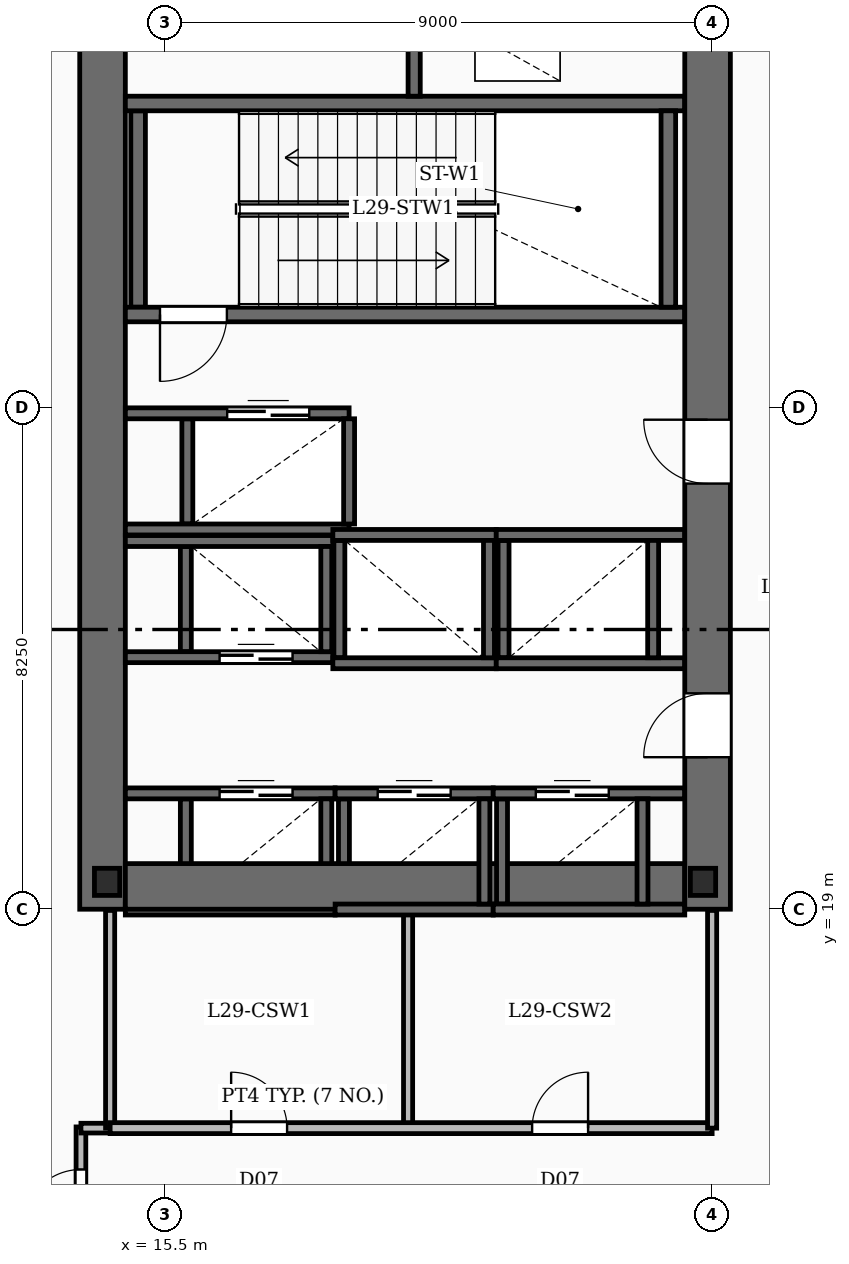
"""IFC4 building model, lengths in metres.
Left out: names, types, materials, properties, quantities, classifications, styles, units other than length and angle.
Written with IfcOpenShell. Run it as: python <this file> out.ifc"""

import sys

from ifc_helpers import new_model, si_unit, direction, frame, frame_2d, origin, origin_2d, place, context, subcontext, project, spatial, rectangle, i_section, extrude, element, fill, save


model = new_model("IFC4")
c1 = context("Model", 3, precision=1e-05, world=origin(), true_north=direction((0.0, 1.0)))
c2 = subcontext(c1, "Body", "Model", "MODEL_VIEW")
j1 = project(units=[si_unit("LENGTHUNIT", "METRE"), si_unit("PLANEANGLEUNIT", "RADIAN")], contexts=[c1])
p1 = place(None, origin())
s1 = spatial("IfcSite", under=j1, at=p1, CompositionType="ELEMENT")
p2 = place(p1, origin())
s2 = spatial("IfcBuilding", under=s1, at=p2, CompositionType="ELEMENT")
p3 = place(p2, frame((0.0, 0.0, 125.95)))
s3 = spatial("IfcBuildingStorey", under=s2, at=p3, CompositionType="ELEMENT", Elevation=125.95)
p4 = place(p3, frame((14.475, 19.0, -0.31), z_axis=(0.0, 0.0, 1.0), x_axis=(0.0, 1.0, 0.0)))
e1 = element("IfcWall", 1, at=p4, inside=s3, PredefinedType="SHEAR", context=c2, shape_type="SweptSolid", body=[
    extrude(rectangle(XDim=15.3, YDim=0.75, at=frame_2d((7.65, 0.0))), origin(), (0.0, 0.0, 1.0), 4.84),
])
p5 = place(p3, frame((24.425, 19.0, -0.31), z_axis=(0.0, 0.0, 1.0), x_axis=(0.0, 1.0, 0.0)))
e2 = element("IfcWall", 2, at=p5, inside=s3, PredefinedType="SHEAR", context=c2, shape_type="SweptSolid", body=[
    extrude(rectangle(XDim=15.3, YDim=0.75, at=frame_2d((7.65, 0.0))), origin(), (0.0, 0.0, 1.0), 4.84),
])
p6 = place(p5, frame((2.5, 0.0, 0.31)))
e3 = element("IfcOpeningElement", 3, at=p6, cuts=e2, PredefinedType="OPENING", context=c2, shape_type="SweptSolid", body=[
    extrude(rectangle(XDim=1.05, YDim=2.15, at=frame_2d((0.525, 1.075))), frame((0.0, 0.385, 0.0), z_axis=(0.0, -1.0, 0.0), x_axis=(1.0, 0.0, 0.0)), (0.0, 0.0, 1.0), 0.77),
])
p7 = place(p5, frame((7.0, 0.0, 0.31)))
e4 = element("IfcOpeningElement", 4, at=p7, cuts=e2, PredefinedType="OPENING", context=c2, shape_type="SweptSolid", body=[
    extrude(rectangle(XDim=1.05, YDim=2.15, at=frame_2d((0.525, 1.075))), frame((0.0, 0.385, 0.0), z_axis=(0.0, -1.0, 0.0), x_axis=(1.0, 0.0, 0.0)), (0.0, 0.0, 1.0), 0.77),
])
p8 = place(p3, frame((14.85, 19.375, -0.31), z_axis=(0.0, 0.0, 1.0), x_axis=(1.0, 0.0, 0.0)))
e5 = element("IfcWall", 5, at=p8, inside=s3, PredefinedType="SHEAR", context=c2, shape_type="SweptSolid", body=[
    extrude(rectangle(XDim=9.2, YDim=0.75, at=frame_2d((4.6, 0.0))), origin(), (0.0, 0.0, 1.0), 4.84),
])
for number, where, z_axis, x_axis in (
    (6, (14.55, 19.45, -0.31), (0.0, 0.0, 1.0), (1.0, 0.0, 0.0)),
    (7, (24.35, 19.45, -0.31), (0.0, 0.0, 1.0), (1.0, 0.0, 0.0)),
):
    element("IfcColumn", number, at=place(p3, frame(where, z_axis=z_axis, x_axis=x_axis)), inside=s3, PredefinedType="COLUMN", context=c2, shape_type="SweptSolid", body=[
        extrude(i_section(OverallWidth=0.416, OverallDepth=0.446, WebThickness=0.039, FlangeThickness=0.063, FilletRadius=0.02, at=origin_2d()), origin(), (0.0, 0.0, 1.0), 4.84),
    ])
p9 = place(p3, frame((24.05, 28.78, 0.0), z_axis=(0.0, 0.0, 1.0), x_axis=(-1.0, 0.0, 0.0)))
e8 = element("IfcWall", 8, at=p9, inside=s3, PredefinedType="SOLIDWALL", context=c2, shape_type="SweptSolid", body=[
    extrude(rectangle(XDim=9.2, YDim=0.24, at=frame_2d((4.6, 0.0))), origin(), (0.0, 0.0, 1.0), 4.53),
])
p10 = place(p9, frame((7.53, 0.0, 0.0)))
e9 = element("IfcOpeningElement", 9, at=p10, cuts=e8, PredefinedType="OPENING", context=c2, shape_type="SweptSolid", body=[
    extrude(rectangle(XDim=1.1, YDim=2.15, at=frame_2d((0.55, 1.075))), frame((0.0, 0.13, 0.0), z_axis=(0.0, -1.0, 0.0), x_axis=(1.0, 0.0, 0.0)), (0.0, 0.0, 1.0), 0.26),
])
p11 = place(p3, frame((14.85, 32.25, 0.0), z_axis=(0.0, 0.0, 1.0), x_axis=(1.0, 0.0, 0.0)))
e10 = element("IfcWall", 10, at=p11, inside=s3, PredefinedType="SOLIDWALL", context=c2, shape_type="SweptSolid", body=[
    extrude(rectangle(XDim=9.2, YDim=0.24, at=frame_2d((4.6, 0.0))), origin(), (0.0, 0.0, 1.0), 4.53),
])
for number, where, z_axis, x_axis in (
    (11, (15.06, 28.9, 0.0), (0.0, 0.0, 1.0), (0.0, 1.0, 0.0)),
    (12, (23.78, 28.9, 0.0), (0.0, 0.0, 1.0), (0.0, 1.0, 0.0)),
):
    element("IfcWall", number, at=place(p3, frame(where, z_axis=z_axis, x_axis=x_axis)), inside=s3, PredefinedType="SOLIDWALL", context=c2, shape_type="SweptSolid", body=[
        extrude(rectangle(XDim=3.23, YDim=0.24, at=frame_2d((1.615, 0.0))), origin(), (0.0, 0.0, 1.0), 4.53),
    ])
p12 = place(p3, frame((19.6, 32.37, 0.0), z_axis=(0.0, 0.0, 1.0), x_axis=(0.0, 1.0, 0.0)))
e13 = element("IfcWall", 13, at=p12, inside=s3, PredefinedType="SOLIDWALL", context=c2, shape_type="SweptSolid", body=[
    extrude(rectangle(XDim=1.13, YDim=0.2, at=frame_2d((0.565, 0.0))), origin(), (0.0, 0.0, 1.0), 4.53),
])
p13 = place(p3, frame((14.85, 20.905, 0.0), z_axis=(0.0, 0.0, 1.0), x_axis=(1.0, 0.0, 0.0)))
e14 = element("IfcWall", 14, at=p13, inside=s3, PredefinedType="SOLIDWALL", context=c2, shape_type="SweptSolid", body=[
    extrude(rectangle(XDim=3.45, YDim=0.18, at=frame_2d((1.725, 0.0))), origin(), (0.0, 0.0, 1.0), 4.53),
])
p14 = place(p13, frame((1.55, 0.0, 0.0)))
e15 = element("IfcOpeningElement", 15, at=p14, cuts=e14, PredefinedType="OPENING", context=c2, shape_type="SweptSolid", body=[
    extrude(rectangle(XDim=1.2, YDim=2.2, at=frame_2d((0.6, 1.1))), frame((0.0, 0.1, 0.0), z_axis=(0.0, -1.0, 0.0), x_axis=(1.0, 0.0, 0.0)), (0.0, 0.0, 1.0), 0.2),
])
p15 = place(p3, frame((14.85, 18.995, 0.0), z_axis=(0.0, 0.0, 1.0), x_axis=(1.0, 0.0, 0.0)))
e16 = element("IfcWall", 16, at=p15, inside=s3, PredefinedType="SOLIDWALL", context=c2, shape_type="SweptSolid", body=[
    extrude(rectangle(XDim=3.45, YDim=0.18, at=frame_2d((1.725, 0.0))), origin(), (0.0, 0.0, 1.0), 4.53),
])
for number, where, z_axis, x_axis in (
    (17, (15.845, 19.085, 0.0), (0.0, 0.0, 1.0), (0.0, 1.0, 0.0)),
    (18, (18.155, 19.085, 0.0), (0.0, 0.0, 1.0), (0.0, 1.0, 0.0)),
):
    element("IfcWall", number, at=place(p3, frame(where, z_axis=z_axis, x_axis=x_axis)), inside=s3, PredefinedType="SOLIDWALL", context=c2, shape_type="SweptSolid", body=[
        extrude(rectangle(XDim=1.73, YDim=0.18, at=frame_2d((0.865, 0.0))), origin(), (0.0, 0.0, 1.0), 4.53),
    ])
p16 = place(p3, frame((18.3, 20.905, 0.0), z_axis=(0.0, 0.0, 1.0), x_axis=(1.0, 0.0, 0.0)))
e19 = element("IfcWall", 19, at=p16, inside=s3, PredefinedType="SOLIDWALL", context=c2, shape_type="SweptSolid", body=[
    extrude(rectangle(XDim=2.6, YDim=0.18, at=frame_2d((1.3, 0.0))), origin(), (0.0, 0.0, 1.0), 4.53),
])
p17 = place(p16, frame((0.7, 0.0, 0.0)))
e20 = element("IfcOpeningElement", 20, at=p17, cuts=e19, PredefinedType="OPENING", context=c2, shape_type="SweptSolid", body=[
    extrude(rectangle(XDim=1.2, YDim=2.2, at=frame_2d((0.6, 1.1))), frame((0.0, 0.1, 0.0), z_axis=(0.0, -1.0, 0.0), x_axis=(1.0, 0.0, 0.0)), (0.0, 0.0, 1.0), 0.2),
])
p18 = place(p3, frame((18.3, 18.995, 0.0), z_axis=(0.0, 0.0, 1.0), x_axis=(1.0, 0.0, 0.0)))
e21 = element("IfcWall", 21, at=p18, inside=s3, PredefinedType="SOLIDWALL", context=c2, shape_type="SweptSolid", body=[
    extrude(rectangle(XDim=2.6, YDim=0.18, at=frame_2d((1.3, 0.0))), origin(), (0.0, 0.0, 1.0), 4.53),
])
for number, where, z_axis, x_axis in (
    (22, (18.445, 19.085, 0.0), (0.0, 0.0, 1.0), (0.0, 1.0, 0.0)),
    (23, (20.755, 19.085, 0.0), (0.0, 0.0, 1.0), (0.0, 1.0, 0.0)),
):
    element("IfcWall", number, at=place(p3, frame(where, z_axis=z_axis, x_axis=x_axis)), inside=s3, PredefinedType="SOLIDWALL", context=c2, shape_type="SweptSolid", body=[
        extrude(rectangle(XDim=1.73, YDim=0.18, at=frame_2d((0.865, 0.0))), origin(), (0.0, 0.0, 1.0), 4.53),
    ])
p19 = place(p3, frame((20.9, 20.905, 0.0), z_axis=(0.0, 0.0, 1.0), x_axis=(1.0, 0.0, 0.0)))
e24 = element("IfcWall", 24, at=p19, inside=s3, PredefinedType="SOLIDWALL", context=c2, shape_type="SweptSolid", body=[
    extrude(rectangle(XDim=3.15, YDim=0.18, at=frame_2d((1.575, 0.0))), origin(), (0.0, 0.0, 1.0), 4.53),
])
p20 = place(p19, frame((0.7, 0.0, 0.0)))
e25 = element("IfcOpeningElement", 25, at=p20, cuts=e24, PredefinedType="OPENING", context=c2, shape_type="SweptSolid", body=[
    extrude(rectangle(XDim=1.2, YDim=2.2, at=frame_2d((0.6, 1.1))), frame((0.0, 0.1, 0.0), z_axis=(0.0, -1.0, 0.0), x_axis=(1.0, 0.0, 0.0)), (0.0, 0.0, 1.0), 0.2),
])
p21 = place(p3, frame((20.9, 18.995, 0.0), z_axis=(0.0, 0.0, 1.0), x_axis=(1.0, 0.0, 0.0)))
e26 = element("IfcWall", 26, at=p21, inside=s3, PredefinedType="SOLIDWALL", context=c2, shape_type="SweptSolid", body=[
    extrude(rectangle(XDim=3.15, YDim=0.18, at=frame_2d((1.575, 0.0))), origin(), (0.0, 0.0, 1.0), 4.53),
])
for number, where, z_axis, x_axis in (
    (27, (21.045, 19.085, 0.0), (0.0, 0.0, 1.0), (0.0, 1.0, 0.0)),
    (28, (23.355, 19.085, 0.0), (0.0, 0.0, 1.0), (0.0, 1.0, 0.0)),
):
    element("IfcWall", number, at=place(p3, frame(where, z_axis=z_axis, x_axis=x_axis)), inside=s3, PredefinedType="SOLIDWALL", context=c2, shape_type="SweptSolid", body=[
        extrude(rectangle(XDim=1.73, YDim=0.18, at=frame_2d((0.865, 0.0))), origin(), (0.0, 0.0, 1.0), 4.53),
    ])
p22 = place(p3, frame((14.85, 25.055, 0.0), z_axis=(0.0, 0.0, 1.0), x_axis=(1.0, 0.0, 0.0)))
e29 = element("IfcWall", 29, at=p22, inside=s3, PredefinedType="SOLIDWALL", context=c2, shape_type="SweptSolid", body=[
    extrude(rectangle(XDim=3.412, YDim=0.18, at=frame_2d((1.706, 0.0))), origin(), (0.0, 0.0, 1.0), 4.53),
])
p23 = place(p3, frame((14.85, 23.145, 0.0), z_axis=(0.0, 0.0, 1.0), x_axis=(1.0, 0.0, 0.0)))
e30 = element("IfcWall", 30, at=p23, inside=s3, PredefinedType="SOLIDWALL", context=c2, shape_type="SweptSolid", body=[
    extrude(rectangle(XDim=3.412, YDim=0.18, at=frame_2d((1.706, 0.0))), origin(), (0.0, 0.0, 1.0), 4.53),
])
p24 = place(p23, frame((1.55, 0.0, 0.0)))
e31 = element("IfcOpeningElement", 31, at=p24, cuts=e30, PredefinedType="OPENING", context=c2, shape_type="SweptSolid", body=[
    extrude(rectangle(XDim=1.2, YDim=2.2, at=frame_2d((0.6, 1.1))), frame((0.0, 0.1, 0.0), z_axis=(0.0, -1.0, 0.0), x_axis=(1.0, 0.0, 0.0)), (0.0, 0.0, 1.0), 0.2),
])
for number, where, z_axis, x_axis in (
    (32, (15.845, 23.235, 0.0), (0.0, 0.0, 1.0), (0.0, 1.0, 0.0)),
    (33, (18.155, 23.235, 0.0), (0.0, 0.0, 1.0), (0.0, 1.0, 0.0)),
):
    element("IfcWall", number, at=place(p3, frame(where, z_axis=z_axis, x_axis=x_axis)), inside=s3, PredefinedType="SOLIDWALL", context=c2, shape_type="SweptSolid", body=[
        extrude(rectangle(XDim=1.73, YDim=0.18, at=frame_2d((0.865, 0.0))), origin(), (0.0, 0.0, 1.0), 4.53),
    ])
for number, where, z_axis, x_axis in (
    (34, (18.262, 25.155, 0.0), (0.0, 0.0, 1.0), (1.0, 0.0, 0.0)),
    (35, (18.262, 23.045, 0.0), (0.0, 0.0, 1.0), (1.0, 0.0, 0.0)),
):
    element("IfcWall", number, at=place(p3, frame(where, z_axis=z_axis, x_axis=x_axis)), inside=s3, PredefinedType="SOLIDWALL", context=c2, shape_type="SweptSolid", body=[
        extrude(rectangle(XDim=2.688, YDim=0.18, at=frame_2d((1.344, 0.0))), origin(), (0.0, 0.0, 1.0), 4.53),
    ])
for number, where, z_axis, x_axis in (
    (36, (18.37, 23.135, 0.0), (0.0, 0.0, 1.0), (0.0, 1.0, 0.0)),
    (37, (20.83, 23.135, 0.0), (0.0, 0.0, 1.0), (0.0, 1.0, 0.0)),
):
    element("IfcWall", number, at=place(p3, frame(where, z_axis=z_axis, x_axis=x_axis)), inside=s3, PredefinedType="SOLIDWALL", context=c2, shape_type="SweptSolid", body=[
        extrude(rectangle(XDim=1.93, YDim=0.18, at=frame_2d((0.965, 0.0))), origin(), (0.0, 0.0, 1.0), 4.53),
    ])
for number, where, z_axis, x_axis in (
    (38, (20.95, 25.155, 0.0), (0.0, 0.0, 1.0), (1.0, 0.0, 0.0)),
    (39, (20.95, 23.045, 0.0), (0.0, 0.0, 1.0), (1.0, 0.0, 0.0)),
):
    element("IfcWall", number, at=place(p3, frame(where, z_axis=z_axis, x_axis=x_axis)), inside=s3, PredefinedType="SOLIDWALL", context=c2, shape_type="SweptSolid", body=[
        extrude(rectangle(XDim=3.1, YDim=0.18, at=frame_2d((1.55, 0.0))), origin(), (0.0, 0.0, 1.0), 4.53),
    ])
for number, where, z_axis, x_axis in (
    (40, (21.07, 23.135, 0.0), (0.0, 0.0, 1.0), (0.0, 1.0, 0.0)),
    (41, (23.53, 23.135, 0.0), (0.0, 0.0, 1.0), (0.0, 1.0, 0.0)),
):
    element("IfcWall", number, at=place(p3, frame(where, z_axis=z_axis, x_axis=x_axis)), inside=s3, PredefinedType="SOLIDWALL", context=c2, shape_type="SweptSolid", body=[
        extrude(rectangle(XDim=1.93, YDim=0.18, at=frame_2d((0.965, 0.0))), origin(), (0.0, 0.0, 1.0), 4.53),
    ])
p25 = place(p3, frame((14.85, 27.155, 0.0), z_axis=(0.0, 0.0, 1.0), x_axis=(1.0, 0.0, 0.0)))
e42 = element("IfcWall", 42, at=p25, inside=s3, PredefinedType="SOLIDWALL", context=c2, shape_type="SweptSolid", body=[
    extrude(rectangle(XDim=3.68, YDim=0.18, at=frame_2d((1.84, 0.0))), origin(), (0.0, 0.0, 1.0), 4.53),
])
p26 = place(p25, frame((1.675, 0.0, 0.0)))
e43 = element("IfcOpeningElement", 43, at=p26, cuts=e42, PredefinedType="OPENING", context=c2, shape_type="SweptSolid", body=[
    extrude(rectangle(XDim=1.35, YDim=2.3, at=frame_2d((0.675, 1.15))), frame((0.0, 0.1, 0.0), z_axis=(0.0, -1.0, 0.0), x_axis=(1.0, 0.0, 0.0)), (0.0, 0.0, 1.0), 0.2),
])
p27 = place(p3, frame((14.85, 25.245, 0.0), z_axis=(0.0, 0.0, 1.0), x_axis=(1.0, 0.0, 0.0)))
e44 = element("IfcWall", 44, at=p27, inside=s3, PredefinedType="SOLIDWALL", context=c2, shape_type="SweptSolid", body=[
    extrude(rectangle(XDim=3.68, YDim=0.18, at=frame_2d((1.84, 0.0))), origin(), (0.0, 0.0, 1.0), 4.53),
])
for number, where, z_axis, x_axis in (
    (45, (15.87, 25.335, 0.0), (0.0, 0.0, 1.0), (0.0, 1.0, 0.0)),
    (46, (18.53, 25.335, 0.0), (0.0, 0.0, 1.0), (0.0, 1.0, 0.0)),
):
    element("IfcWall", number, at=place(p3, frame(where, z_axis=z_axis, x_axis=x_axis)), inside=s3, PredefinedType="SOLIDWALL", context=c2, shape_type="SweptSolid", body=[
        extrude(rectangle(XDim=1.73, YDim=0.18, at=frame_2d((0.865, 0.0))), origin(), (0.0, 0.0, 1.0), 4.53),
    ])
p28 = place(p3, frame((19.5, 15.4, 0.0), z_axis=(0.0, 0.0, 1.0), x_axis=(0.0, 1.0, 0.0)))
e47 = element("IfcWall", 47, at=p28, inside=s3, PredefinedType="PARTITIONING", context=c2, shape_type="SweptSolid", body=[
    extrude(rectangle(XDim=3.58, YDim=0.15, at=frame_2d((1.79, 0.0))), origin(), (0.0, 0.0, 1.0), 3.59),
])
p29 = place(p3, frame((14.6, 15.4, 0.0), z_axis=(0.0, 0.0, 1.0), x_axis=(1.0, 0.0, 0.0)))
e48 = element("IfcWall", 48, at=p29, inside=s3, PredefinedType="PARTITIONING", context=c2, shape_type="SweptSolid", body=[
    extrude(rectangle(XDim=9.9, YDim=0.18, at=frame_2d((4.95, 0.0))), origin(), (0.0, 0.0, 1.0), 3.59),
])
p30 = place(p29, frame((1.99, 0.0, 0.0)))
e49 = element("IfcOpeningElement", 49, at=p30, cuts=e48, PredefinedType="OPENING", context=c2, shape_type="SweptSolid", body=[
    extrude(rectangle(XDim=0.92, YDim=2.1, at=frame_2d((0.46, 1.05))), frame((0.0, 0.1, 0.0), z_axis=(0.0, -1.0, 0.0), x_axis=(1.0, 0.0, 0.0)), (0.0, 0.0, 1.0), 0.2),
])
p31 = place(p29, frame((6.94, 0.0, 0.0)))
e50 = element("IfcOpeningElement", 50, at=p31, cuts=e48, PredefinedType="OPENING", context=c2, shape_type="SweptSolid", body=[
    extrude(rectangle(XDim=0.92, YDim=2.1, at=frame_2d((0.46, 1.05))), frame((0.0, 0.1, 0.0), z_axis=(0.0, -1.0, 0.0), x_axis=(1.0, 0.0, 0.0)), (0.0, 0.0, 1.0), 0.2),
])
for number, where, z_axis, x_axis in (
    (51, (14.6, 15.4, 0.0), (0.0, 0.0, 1.0), (0.0, 1.0, 0.0)),
    (52, (24.5, 15.4, 0.0), (0.0, 0.0, 1.0), (0.0, 1.0, 0.0)),
):
    element("IfcWall", number, at=place(p3, frame(where, z_axis=z_axis, x_axis=x_axis)), inside=s3, PredefinedType="PARTITIONING", context=c2, shape_type="SweptSolid", body=[
        extrude(rectangle(XDim=3.58, YDim=0.15, at=frame_2d((1.79, 0.0))), origin(), (0.0, 0.0, 1.0), 3.59),
    ])
p32 = place(p3, frame((14.12, 15.4, 0.0), z_axis=(0.0, 0.0, 1.0), x_axis=(1.0, 0.0, 0.0)))
e53 = element("IfcWall", 53, at=p32, inside=s3, PredefinedType="PARTITIONING", context=c2, shape_type="SweptSolid", body=[
    extrude(rectangle(XDim=0.5, YDim=0.16, at=frame_2d((0.25, 0.0))), origin(), (0.0, 0.0, 1.0), 3.59),
])
p33 = place(p3, frame((14.12, 13.12, 0.0), z_axis=(0.0, 0.0, 1.0), x_axis=(0.0, 1.0, 0.0)))
e54 = element("IfcWall", 54, at=p33, inside=s3, PredefinedType="PARTITIONING", context=c2, shape_type="SweptSolid", body=[
    extrude(rectangle(XDim=2.3, YDim=0.16, at=frame_2d((1.15, 0.0))), origin(), (0.0, 0.0, 1.0), 3.59),
])
p34 = place(p33, frame((0.65, 0.0, 0.0)))
e55 = element("IfcOpeningElement", 55, at=p34, cuts=e54, PredefinedType="OPENING", context=c2, shape_type="SweptSolid", body=[
    extrude(rectangle(XDim=0.95, YDim=2.15, at=frame_2d((0.475, 1.075))), frame((0.0, 0.09, 0.0), z_axis=(0.0, -1.0, 0.0), x_axis=(1.0, 0.0, 0.0)), (0.0, 0.0, 1.0), 0.18),
])
p35 = place(p6, origin())
e56 = element("IfcDoor", 56, at=p35, inside=s3, OperationType="SINGLE_SWING_LEFT", PredefinedType="DOOR", context=c2, shape_type="SweptSolid", body=[
    extrude(rectangle(XDim=1.05, YDim=2.15, at=frame_2d((0.525, 1.075))), frame((0.0, 0.025, 0.0), z_axis=(0.0, -1.0, 0.0), x_axis=(1.0, 0.0, 0.0)), (0.0, 0.0, 1.0), 0.05),
])
fill(e3, e56)
p36 = place(p7, origin())
e57 = element("IfcDoor", 57, at=p36, inside=s3, OperationType="SINGLE_SWING_RIGHT", PredefinedType="DOOR", context=c2, shape_type="SweptSolid", body=[
    extrude(rectangle(XDim=1.05, YDim=2.15, at=frame_2d((0.525, 1.075))), frame((0.0, 0.025, 0.0), z_axis=(0.0, -1.0, 0.0), x_axis=(1.0, 0.0, 0.0)), (0.0, 0.0, 1.0), 0.05),
])
fill(e4, e57)
p37 = place(p10, origin())
e58 = element("IfcDoor", 58, at=p37, inside=s3, OperationType="SINGLE_SWING_RIGHT", PredefinedType="DOOR", context=c2, shape_type="SweptSolid", body=[
    extrude(rectangle(XDim=1.1, YDim=2.15, at=frame_2d((0.55, 1.075))), frame((0.0, 0.025, 0.0), z_axis=(0.0, -1.0, 0.0), x_axis=(1.0, 0.0, 0.0)), (0.0, 0.0, 1.0), 0.05),
])
fill(e9, e58)
p38 = place(p14, origin())
e59 = element("IfcDoor", 59, at=p38, inside=s3, OperationType="DOUBLE_DOOR_SLIDING", PredefinedType="DOOR", context=c2, shape_type="SweptSolid", body=[
    extrude(rectangle(XDim=1.2, YDim=2.2, at=frame_2d((0.6, 1.1))), frame((0.0, 0.025, 0.0), z_axis=(0.0, -1.0, 0.0), x_axis=(1.0, 0.0, 0.0)), (0.0, 0.0, 1.0), 0.05),
])
fill(e15, e59)
p39 = place(p17, origin())
e60 = element("IfcDoor", 60, at=p39, inside=s3, OperationType="DOUBLE_DOOR_SLIDING", PredefinedType="DOOR", context=c2, shape_type="SweptSolid", body=[
    extrude(rectangle(XDim=1.2, YDim=2.2, at=frame_2d((0.6, 1.1))), frame((0.0, 0.025, 0.0), z_axis=(0.0, -1.0, 0.0), x_axis=(1.0, 0.0, 0.0)), (0.0, 0.0, 1.0), 0.05),
])
fill(e20, e60)
p40 = place(p20, origin())
e61 = element("IfcDoor", 61, at=p40, inside=s3, OperationType="DOUBLE_DOOR_SLIDING", PredefinedType="DOOR", context=c2, shape_type="SweptSolid", body=[
    extrude(rectangle(XDim=1.2, YDim=2.2, at=frame_2d((0.6, 1.1))), frame((0.0, 0.025, 0.0), z_axis=(0.0, -1.0, 0.0), x_axis=(1.0, 0.0, 0.0)), (0.0, 0.0, 1.0), 0.05),
])
fill(e25, e61)
p41 = place(p24, origin())
e62 = element("IfcDoor", 62, at=p41, inside=s3, OperationType="DOUBLE_DOOR_SLIDING", PredefinedType="DOOR", context=c2, shape_type="SweptSolid", body=[
    extrude(rectangle(XDim=1.2, YDim=2.2, at=frame_2d((0.6, 1.1))), frame((0.0, 0.025, 0.0), z_axis=(0.0, -1.0, 0.0), x_axis=(1.0, 0.0, 0.0)), (0.0, 0.0, 1.0), 0.05),
])
fill(e31, e62)
p42 = place(p26, origin())
e63 = element("IfcDoor", 63, at=p42, inside=s3, OperationType="DOUBLE_DOOR_SLIDING", PredefinedType="DOOR", context=c2, shape_type="SweptSolid", body=[
    extrude(rectangle(XDim=1.35, YDim=2.3, at=frame_2d((0.675, 1.15))), frame((0.0, 0.025, 0.0), z_axis=(0.0, -1.0, 0.0), x_axis=(1.0, 0.0, 0.0)), (0.0, 0.0, 1.0), 0.05),
])
fill(e43, e63)
p43 = place(p30, origin())
e64 = element("IfcDoor", 64, at=p43, inside=s3, OperationType="SINGLE_SWING_LEFT", PredefinedType="DOOR", context=c2, shape_type="SweptSolid", body=[
    extrude(rectangle(XDim=0.92, YDim=2.1, at=frame_2d((0.46, 1.05))), frame((0.0, 0.025, 0.0), z_axis=(0.0, -1.0, 0.0), x_axis=(1.0, 0.0, 0.0)), (0.0, 0.0, 1.0), 0.05),
])
fill(e49, e64)
p44 = place(p31, origin())
e65 = element("IfcDoor", 65, at=p44, inside=s3, OperationType="SINGLE_SWING_RIGHT", PredefinedType="DOOR", context=c2, shape_type="SweptSolid", body=[
    extrude(rectangle(XDim=0.92, YDim=2.1, at=frame_2d((0.46, 1.05))), frame((0.0, 0.025, 0.0), z_axis=(0.0, -1.0, 0.0), x_axis=(1.0, 0.0, 0.0)), (0.0, 0.0, 1.0), 0.05),
])
fill(e50, e65)
p45 = place(p34, origin())
e66 = element("IfcDoor", 66, at=p45, inside=s3, OperationType="SINGLE_SWING_LEFT", PredefinedType="DOOR", context=c2, shape_type="SweptSolid", body=[
    extrude(rectangle(XDim=0.95, YDim=2.15, at=frame_2d((0.475, 1.075))), frame((0.0, 0.025, 0.0), z_axis=(0.0, -1.0, 0.0), x_axis=(1.0, 0.0, 0.0)), (0.0, 0.0, 1.0), 0.05),
])
fill(e55, e66)
save(model, sys.argv[1])
